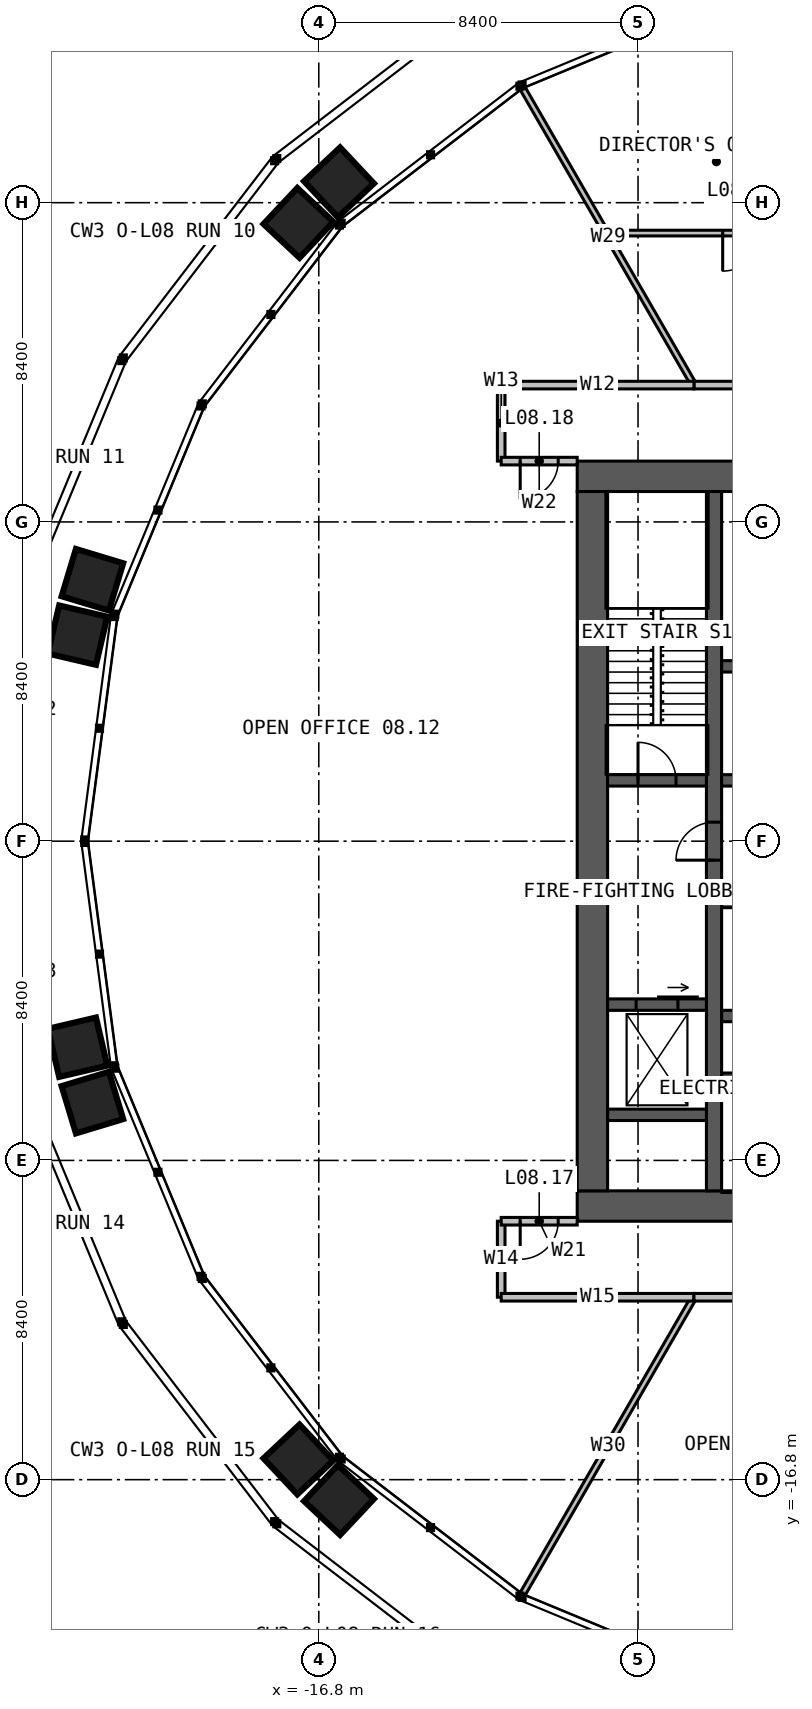
"""IFC4 building model, lengths in metres.
Left out: names, types, materials, properties, quantities, classifications, styles, units other than length and angle.
Written with IfcOpenShell. Run it as: python <this file> out.ifc"""

import sys

from ifc_helpers import new_model, si_unit, direction, frame, frame_2d, origin, place, context, subcontext, project, spatial, rectangle, extrude, element, fill, save


model = new_model("IFC4")
c1 = context("Model", 3, precision=1e-05, world=origin(), true_north=direction((0.0, 1.0)))
c2 = subcontext(c1, "Body", "Model", "MODEL_VIEW")
j1 = project(units=[si_unit("LENGTHUNIT", "METRE"), si_unit("PLANEANGLEUNIT", "RADIAN")], contexts=[c1])
p1 = place(None, origin())
s1 = spatial("IfcSite", under=j1, at=p1, CompositionType="ELEMENT")
p2 = place(p1, origin())
s2 = spatial("IfcBuilding", under=s1, at=p2, CompositionType="ELEMENT")
p3 = place(p2, frame((0.0, 0.0, 37.0)))
s3 = spatial("IfcBuildingStorey", under=s2, at=p3, CompositionType="ELEMENT", Elevation=37.0)
p4 = place(p3, frame((-10.0, 9.6, 0.0), z_axis=(0.0, 0.0, 1.0), x_axis=(1.0, 0.0, 0.0)))
e1 = element("IfcWall", 1, at=p4, inside=s3, PredefinedType="SOLIDWALL", context=c2, shape_type="SweptSolid", body=[
    extrude(rectangle(XDim=20.0, YDim=0.8, at=frame_2d((10.0, 0.0))), origin(), (0.0, 0.0, 1.0), 4.0),
])
p5 = place(p4, frame((9.4, 0.0, 0.0)))
e2 = element("IfcOpeningElement", 2, at=p5, cuts=e1, PredefinedType="OPENING", context=c2, shape_type="SweptSolid", body=[
    extrude(rectangle(XDim=1.2, YDim=2.2, at=frame_2d((0.6, 1.1))), frame((0.0, 0.41, 0.0), z_axis=(0.0, -1.0, 0.0), x_axis=(1.0, 0.0, 0.0)), (0.0, 0.0, 1.0), 0.82),
])
p6 = place(p3, frame((10.0, -9.6, 0.0), z_axis=(0.0, 0.0, 1.0), x_axis=(-1.0, 0.0, 0.0)))
e3 = element("IfcWall", 3, at=p6, inside=s3, PredefinedType="SOLIDWALL", context=c2, shape_type="SweptSolid", body=[
    extrude(rectangle(XDim=20.0, YDim=0.8, at=frame_2d((10.0, 0.0))), origin(), (0.0, 0.0, 1.0), 4.0),
])
p7 = place(p6, frame((6.875, 0.0, 0.0)))
e4 = element("IfcOpeningElement", 4, at=p7, cuts=e3, PredefinedType="OPENING", context=c2, shape_type="SweptSolid", body=[
    extrude(rectangle(XDim=1.2, YDim=2.2, at=frame_2d((0.6, 1.1))), frame((0.0, 0.41, 0.0), z_axis=(0.0, -1.0, 0.0), x_axis=(1.0, 0.0, 0.0)), (0.0, 0.0, 1.0), 0.82),
])
p8 = place(p3, frame((-9.6, 9.2, 0.0), z_axis=(0.0, 0.0, 1.0), x_axis=(0.0, -1.0, 0.0)))
e5 = element("IfcWall", 5, at=p8, inside=s3, PredefinedType="SOLIDWALL", context=c2, shape_type="SweptSolid", body=[
    extrude(rectangle(XDim=18.4, YDim=0.8, at=frame_2d((9.2, 0.0))), origin(), (0.0, 0.0, 1.0), 4.0),
])
p9 = place(p3, frame((-6.4, -9.2, 0.0), z_axis=(0.0, 0.0, 1.0), x_axis=(0.0, 1.0, 0.0)))
e6 = element("IfcWall", 6, at=p9, inside=s3, PredefinedType="SOLIDWALL", context=c2, shape_type="SweptSolid", body=[
    extrude(rectangle(XDim=18.4, YDim=0.4, at=frame_2d((9.2, 0.0))), origin(), (0.0, 0.0, 1.0), 4.0),
])
p10 = place(p9, frame((8.7, 0.0, 0.0)))
e7 = element("IfcOpeningElement", 7, at=p10, cuts=e6, PredefinedType="OPENING", context=c2, shape_type="SweptSolid", body=[
    extrude(rectangle(XDim=1.0, YDim=2.2, at=frame_2d((0.5, 1.1))), frame((0.0, 0.21, 0.0), z_axis=(0.0, -1.0, 0.0), x_axis=(1.0, 0.0, 0.0)), (0.0, 0.0, 1.0), 0.42),
])
p11 = place(p3, frame((-6.2, 1.6, 0.0), z_axis=(0.0, 0.0, 1.0), x_axis=(1.0, 0.0, 0.0)))
e8 = element("IfcWall", 8, at=p11, inside=s3, PredefinedType="SOLIDWALL", context=c2, shape_type="SweptSolid", body=[
    extrude(rectangle(XDim=4.85, YDim=0.3, at=frame_2d((2.425, 0.0))), origin(), (0.0, 0.0, 1.0), 4.0),
])
p12 = place(p11, frame((0.625, 0.0, 0.0)))
e9 = element("IfcOpeningElement", 9, at=p12, cuts=e8, PredefinedType="OPENING", context=c2, shape_type="SweptSolid", body=[
    extrude(rectangle(XDim=1.1, YDim=2.2, at=frame_2d((0.55, 1.1))), frame((0.0, 0.16, 0.0), z_axis=(0.0, -1.0, 0.0), x_axis=(1.0, 0.0, 0.0)), (0.0, 0.0, 1.0), 0.32),
])
p13 = place(p11, frame((3.15, 0.0, 0.0)))
e10 = element("IfcOpeningElement", 10, at=p13, cuts=e8, PredefinedType="OPENING", context=c2, shape_type="SweptSolid", body=[
    extrude(rectangle(XDim=1.1, YDim=2.2, at=frame_2d((0.55, 1.1))), frame((0.0, 0.16, 0.0), z_axis=(0.0, -1.0, 0.0), x_axis=(1.0, 0.0, 0.0)), (0.0, 0.0, 1.0), 0.32),
])
p14 = place(p3, frame((-6.2, 4.6, 0.0), z_axis=(0.0, 0.0, 1.0), x_axis=(1.0, 0.0, 0.0)))
e11 = element("IfcWall", 11, at=p14, inside=s3, PredefinedType="SOLIDWALL", context=c2, shape_type="SweptSolid", body=[
    extrude(rectangle(XDim=4.85, YDim=0.3, at=frame_2d((2.425, 0.0))), origin(), (0.0, 0.0, 1.0), 4.0),
])
for number, where, z_axis, x_axis in (
    (12, (-6.2, -1.6, 0.0), (0.0, 0.0, 1.0), (1.0, 0.0, 0.0)),
    (13, (-6.2, -4.6, 0.0), (0.0, 0.0, 1.0), (1.0, 0.0, 0.0)),
):
    element("IfcWall", number, at=place(p3, frame(where, z_axis=z_axis, x_axis=x_axis)), inside=s3, PredefinedType="SOLIDWALL", context=c2, shape_type="SweptSolid", body=[
        extrude(rectangle(XDim=7.4, YDim=0.3, at=frame_2d((3.7, 0.0))), origin(), (0.0, 0.0, 1.0), 4.0),
    ])
p15 = place(p3, frame((-6.2, -6.2, 0.0), z_axis=(0.0, 0.0, 1.0), x_axis=(1.0, 0.0, 0.0)))
e14 = element("IfcWall", 14, at=p15, inside=s3, PredefinedType="SOLIDWALL", context=c2, shape_type="SweptSolid", body=[
    extrude(rectangle(XDim=7.4, YDim=0.2, at=frame_2d((3.7, 0.0))), origin(), (0.0, 0.0, 1.0), 4.0),
])
p16 = place(p3, frame((-9.2, 1.6, 0.0), z_axis=(0.0, 0.0, 1.0), x_axis=(1.0, 0.0, 0.0)))
e15 = element("IfcWall", 15, at=p16, inside=s3, PredefinedType="SOLIDWALL", context=c2, shape_type="SweptSolid", body=[
    extrude(rectangle(XDim=2.6, YDim=0.3, at=frame_2d((1.3, 0.0))), origin(), (0.0, 0.0, 1.0), 4.0),
])
p17 = place(p16, frame((0.8, 0.0, 0.0)))
e16 = element("IfcOpeningElement", 16, at=p17, cuts=e15, PredefinedType="OPENING", context=c2, shape_type="SweptSolid", body=[
    extrude(rectangle(XDim=1.0, YDim=2.2, at=frame_2d((0.5, 1.1))), frame((0.0, 0.16, 0.0), z_axis=(0.0, -1.0, 0.0), x_axis=(1.0, 0.0, 0.0)), (0.0, 0.0, 1.0), 0.32),
])
p18 = place(p3, frame((-9.2, -4.3, 0.0), z_axis=(0.0, 0.0, 1.0), x_axis=(1.0, 0.0, 0.0)))
e17 = element("IfcWall", 17, at=p18, inside=s3, PredefinedType="SOLIDWALL", context=c2, shape_type="SweptSolid", body=[
    extrude(rectangle(XDim=2.6, YDim=0.3, at=frame_2d((1.3, 0.0))), origin(), (0.0, 0.0, 1.0), 4.0),
])
p19 = place(p18, frame((0.75, 0.0, 0.0)))
e18 = element("IfcOpeningElement", 18, at=p19, cuts=e17, PredefinedType="OPENING", context=c2, shape_type="SweptSolid", body=[
    extrude(rectangle(XDim=1.1, YDim=2.2, at=frame_2d((0.55, 1.1))), frame((0.0, 0.16, 0.0), z_axis=(0.0, -1.0, 0.0), x_axis=(1.0, 0.0, 0.0)), (0.0, 0.0, 1.0), 0.32),
])
p20 = place(p3, frame((-9.2, -7.2, 0.0), z_axis=(0.0, 0.0, 1.0), x_axis=(1.0, 0.0, 0.0)))
e19 = element("IfcWall", 19, at=p20, inside=s3, PredefinedType="SOLIDWALL", context=c2, shape_type="SweptSolid", body=[
    extrude(rectangle(XDim=2.6, YDim=0.3, at=frame_2d((1.3, 0.0))), origin(), (0.0, 0.0, 1.0), 4.0),
])
for number, where, z_axis, x_axis in (
    (20, (-6.928, 12.0, 0.0), (0.0, 0.0, 1.0), (-0.5, 0.866, 0.0)),
    (21, (-6.928, -12.0, 0.0), (0.0, 0.0, 1.0), (-0.5, -0.866, 0.0)),
):
    element("IfcWall", number, at=place(p3, frame(where, z_axis=z_axis, x_axis=x_axis)), inside=s3, PredefinedType="PARTITIONING", context=c2, shape_type="SweptSolid", body=[
        extrude(rectangle(XDim=9.014, YDim=0.15, at=frame_2d((4.507, 0.0))), origin(), (0.0, 0.0, 1.0), 2.79),
    ])
p21 = place(p3, frame((9.238, 16.0, 0.0), z_axis=(0.0, 0.0, 1.0), x_axis=(-1.0, 0.0, 0.0)))
e22 = element("IfcWall", 22, at=p21, inside=s3, PredefinedType="PARTITIONING", context=c2, shape_type="SweptSolid", body=[
    extrude(rectangle(XDim=18.475, YDim=0.15, at=frame_2d((9.238, 0.0))), origin(), (0.0, 0.0, 1.0), 2.79),
])
p22 = place(p21, frame((3.066, 0.0, 0.0)))
e23 = element("IfcOpeningElement", 23, at=p22, cuts=e22, PredefinedType="OPENING", context=c2, shape_type="SweptSolid", body=[
    extrude(rectangle(XDim=1.0, YDim=2.2, at=frame_2d((0.5, 1.1))), frame((0.0, 0.085, 0.0), z_axis=(0.0, -1.0, 0.0), x_axis=(1.0, 0.0, 0.0)), (0.0, 0.0, 1.0), 0.17),
])
p23 = place(p21, frame((8.738, 0.0, 0.0)))
e24 = element("IfcOpeningElement", 24, at=p23, cuts=e22, PredefinedType="OPENING", context=c2, shape_type="SweptSolid", body=[
    extrude(rectangle(XDim=1.0, YDim=2.2, at=frame_2d((0.5, 1.1))), frame((0.0, 0.085, 0.0), z_axis=(0.0, -1.0, 0.0), x_axis=(1.0, 0.0, 0.0)), (0.0, 0.0, 1.0), 0.17),
])
p24 = place(p21, frame((14.41, 0.0, 0.0)))
e25 = element("IfcOpeningElement", 25, at=p24, cuts=e22, PredefinedType="OPENING", context=c2, shape_type="SweptSolid", body=[
    extrude(rectangle(XDim=1.0, YDim=2.2, at=frame_2d((0.5, 1.1))), frame((0.0, 0.085, 0.0), z_axis=(0.0, -1.0, 0.0), x_axis=(1.0, 0.0, 0.0)), (0.0, 0.0, 1.0), 0.17),
])
p25 = place(p3, frame((6.928, 12.0, 0.0), z_axis=(0.0, 0.0, 1.0), x_axis=(-1.0, 0.0, 0.0)))
e26 = element("IfcWall", 26, at=p25, inside=s3, PredefinedType="PARTITIONING", context=c2, shape_type="SweptSolid", body=[
    extrude(rectangle(XDim=13.856, YDim=0.2, at=frame_2d((6.928, 0.0))), origin(), (0.0, 0.0, 1.0), 3.8),
])
p26 = place(p25, frame((6.028, 0.0, 0.0)))
e27 = element("IfcOpeningElement", 27, at=p26, cuts=e26, PredefinedType="OPENING", context=c2, shape_type="SweptSolid", body=[
    extrude(rectangle(XDim=1.8, YDim=2.2, at=frame_2d((0.9, 1.1))), frame((0.0, 0.11, 0.0), z_axis=(0.0, -1.0, 0.0), x_axis=(1.0, 0.0, 0.0)), (0.0, 0.0, 1.0), 0.22),
])
p27 = place(p3, frame((-6.928, 12.0, 0.0), z_axis=(0.0, 0.0, 1.0), x_axis=(-1.0, 0.0, 0.0)))
e28 = element("IfcWall", 28, at=p27, inside=s3, PredefinedType="PARTITIONING", context=c2, shape_type="SweptSolid", body=[
    extrude(rectangle(XDim=5.072, YDim=0.2, at=frame_2d((2.536, 0.0))), origin(), (0.0, 0.0, 1.0), 3.8),
])
for number, where, z_axis, x_axis in (
    (29, (-12.0, 12.0, 0.0), (0.0, 0.0, 1.0), (0.0, -1.0, 0.0)),
    (30, (-12.0, -10.0, 0.0), (0.0, 0.0, 1.0), (0.0, -1.0, 0.0)),
):
    element("IfcWall", number, at=place(p3, frame(where, z_axis=z_axis, x_axis=x_axis)), inside=s3, PredefinedType="PARTITIONING", context=c2, shape_type="SweptSolid", body=[
        extrude(rectangle(XDim=2.0, YDim=0.2, at=frame_2d((1.0, 0.0))), origin(), (0.0, 0.0, 1.0), 3.8),
    ])
p28 = place(p3, frame((-12.0, -12.0, 0.0), z_axis=(0.0, 0.0, 1.0), x_axis=(1.0, 0.0, 0.0)))
e31 = element("IfcWall", 31, at=p28, inside=s3, PredefinedType="PARTITIONING", context=c2, shape_type="SweptSolid", body=[
    extrude(rectangle(XDim=5.072, YDim=0.2, at=frame_2d((2.536, 0.0))), origin(), (0.0, 0.0, 1.0), 3.8),
])
p29 = place(p3, frame((-6.928, -12.0, 0.0), z_axis=(0.0, 0.0, 1.0), x_axis=(1.0, 0.0, 0.0)))
e32 = element("IfcWall", 32, at=p29, inside=s3, PredefinedType="PARTITIONING", context=c2, shape_type="SweptSolid", body=[
    extrude(rectangle(XDim=6.928, YDim=0.2, at=frame_2d((3.464, 0.0))), origin(), (0.0, 0.0, 1.0), 3.8),
])
p30 = place(p29, frame((2.564, 0.0, 0.0)))
e33 = element("IfcOpeningElement", 33, at=p30, cuts=e32, PredefinedType="OPENING", context=c2, shape_type="SweptSolid", body=[
    extrude(rectangle(XDim=1.8, YDim=2.2, at=frame_2d((0.9, 1.1))), frame((0.0, 0.11, 0.0), z_axis=(0.0, -1.0, 0.0), x_axis=(1.0, 0.0, 0.0)), (0.0, 0.0, 1.0), 0.22),
])
p31 = place(p3, frame((-10.0, -10.0, 0.0), z_axis=(0.0, 0.0, 1.0), x_axis=(-1.0, 0.0, 0.0)))
e34 = element("IfcWall", 34, at=p31, inside=s3, PredefinedType="PARTITIONING", context=c2, shape_type="SweptSolid", body=[
    extrude(rectangle(XDim=2.0, YDim=0.2, at=frame_2d((1.0, 0.0))), origin(), (0.0, 0.0, 1.0), 3.8),
])
p32 = place(p31, frame((0.5, 0.0, 0.0)))
e35 = element("IfcOpeningElement", 35, at=p32, cuts=e34, PredefinedType="OPENING", context=c2, shape_type="SweptSolid", body=[
    extrude(rectangle(XDim=1.0, YDim=2.2, at=frame_2d((0.5, 1.1))), frame((0.0, 0.11, 0.0), z_axis=(0.0, -1.0, 0.0), x_axis=(1.0, 0.0, 0.0)), (0.0, 0.0, 1.0), 0.22),
])
p33 = place(p3, frame((-10.0, 10.0, 0.0), z_axis=(0.0, 0.0, 1.0), x_axis=(-1.0, 0.0, 0.0)))
e36 = element("IfcWall", 36, at=p33, inside=s3, PredefinedType="PARTITIONING", context=c2, shape_type="SweptSolid", body=[
    extrude(rectangle(XDim=2.0, YDim=0.2, at=frame_2d((1.0, 0.0))), origin(), (0.0, 0.0, 1.0), 3.8),
])
p34 = place(p33, frame((0.5, 0.0, 0.0)))
e37 = element("IfcOpeningElement", 37, at=p34, cuts=e36, PredefinedType="OPENING", context=c2, shape_type="SweptSolid", body=[
    extrude(rectangle(XDim=1.0, YDim=2.2, at=frame_2d((0.5, 1.1))), frame((0.0, 0.11, 0.0), z_axis=(0.0, -1.0, 0.0), x_axis=(1.0, 0.0, 0.0)), (0.0, 0.0, 1.0), 0.22),
])
p35 = place(p10, origin())
e38 = element("IfcDoor", 38, at=p35, inside=s3, OperationType="SINGLE_SWING_LEFT", PredefinedType="DOOR", context=c2, shape_type="SweptSolid", body=[
    extrude(rectangle(XDim=1.0, YDim=2.2, at=frame_2d((0.5, 1.1))), frame((0.0, 0.025, 0.0), z_axis=(0.0, -1.0, 0.0), x_axis=(1.0, 0.0, 0.0)), (0.0, 0.0, 1.0), 0.05),
])
fill(e7, e38)
p36 = place(p17, origin())
e39 = element("IfcDoor", 39, at=p36, inside=s3, OperationType="SINGLE_SWING_LEFT", PredefinedType="DOOR", context=c2, shape_type="SweptSolid", body=[
    extrude(rectangle(XDim=1.0, YDim=2.2, at=frame_2d((0.5, 1.1))), frame((0.0, 0.025, 0.0), z_axis=(0.0, -1.0, 0.0), x_axis=(1.0, 0.0, 0.0)), (0.0, 0.0, 1.0), 0.05),
])
fill(e16, e39)
p37 = place(p19, origin())
e40 = element("IfcDoor", 40, at=p37, inside=s3, OperationType="SLIDING_TO_LEFT", PredefinedType="DOOR", context=c2, shape_type="SweptSolid", body=[
    extrude(rectangle(XDim=1.1, YDim=2.2, at=frame_2d((0.55, 1.1))), frame((0.0, 0.025, 0.0), z_axis=(0.0, -1.0, 0.0), x_axis=(1.0, 0.0, 0.0)), (0.0, 0.0, 1.0), 0.05),
])
fill(e18, e40)
p38 = place(p24, origin())
e41 = element("IfcDoor", 41, at=p38, inside=s3, OperationType="SINGLE_SWING_RIGHT", PredefinedType="DOOR", context=c2, shape_type="SweptSolid", body=[
    extrude(rectangle(XDim=1.0, YDim=2.2, at=frame_2d((0.5, 1.1))), frame((0.0, 0.025, 0.0), z_axis=(0.0, -1.0, 0.0), x_axis=(1.0, 0.0, 0.0)), (0.0, 0.0, 1.0), 0.05),
])
fill(e25, e41)
p39 = place(p32, origin())
e42 = element("IfcDoor", 42, at=p39, inside=s3, OperationType="SINGLE_SWING_RIGHT", PredefinedType="DOOR", context=c2, shape_type="SweptSolid", body=[
    extrude(rectangle(XDim=1.0, YDim=2.2, at=frame_2d((0.5, 1.1))), frame((0.0, 0.025, 0.0), z_axis=(0.0, -1.0, 0.0), x_axis=(1.0, 0.0, 0.0)), (0.0, 0.0, 1.0), 0.05),
])
fill(e35, e42)
p40 = place(p34, origin())
e43 = element("IfcDoor", 43, at=p40, inside=s3, OperationType="SINGLE_SWING_RIGHT", PredefinedType="DOOR", context=c2, shape_type="SweptSolid", body=[
    extrude(rectangle(XDim=1.0, YDim=2.2, at=frame_2d((0.5, 1.1))), frame((0.0, 0.025, 0.0), z_axis=(0.0, -1.0, 0.0), x_axis=(1.0, 0.0, 0.0)), (0.0, 0.0, 1.0), 0.05),
])
fill(e37, e43)
save(model, sys.argv[1])
